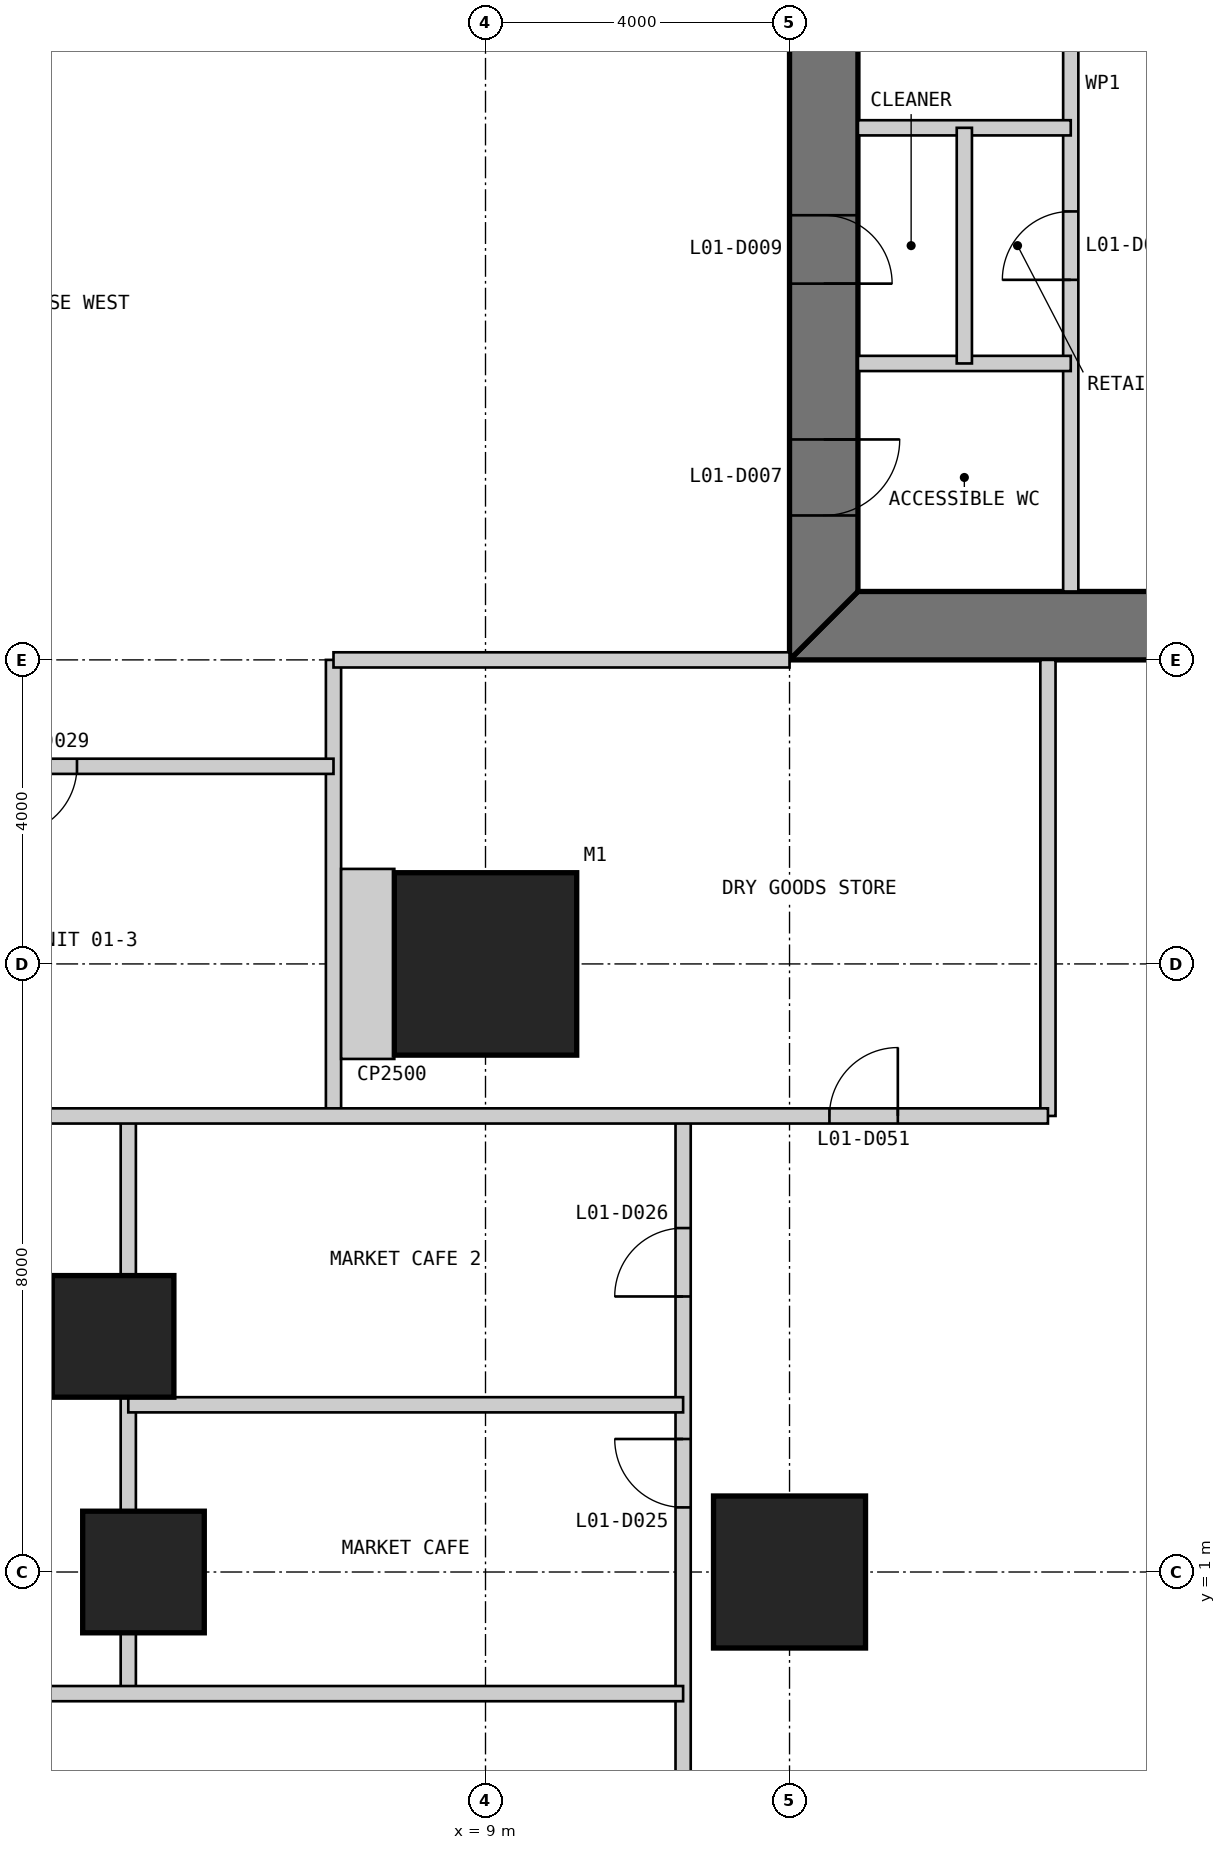
"""IFC4 building model, lengths in metres.
Left out: names, types, materials, properties, quantities, classifications, styles, units other than length and angle.
Written with IfcOpenShell. Run it as: python <this file> out.ifc"""

import sys

from ifc_helpers import new_model, si_unit, direction, frame, frame_2d, origin, origin_2d, place, context, subcontext, project, spatial, polyline, rectangle, outline, extrude, element, fill, save


model = new_model("IFC4")
c1 = context("Model", 3, precision=1e-05, world=origin(), true_north=direction((0.0, 1.0)))
c2 = subcontext(c1, "Body", "Model", "MODEL_VIEW")
j1 = project(units=[si_unit("LENGTHUNIT", "METRE"), si_unit("PLANEANGLEUNIT", "RADIAN")], contexts=[c1])
p1 = place(None, origin())
s1 = spatial("IfcSite", under=j1, at=p1, CompositionType="ELEMENT")
p2 = place(p1, origin())
s2 = spatial("IfcBuilding", under=s1, at=p2, CompositionType="ELEMENT")
p3 = place(p2, frame((0.0, 0.0, 7.0)))
s3 = spatial("IfcBuildingStorey", under=s2, at=p3, CompositionType="ELEMENT", Elevation=7.0)
p4 = place(p3, frame((9.0, 9.0, 0.0), z_axis=(0.0, 0.0, 1.0), x_axis=(1.0, 0.0, 0.0)))
e1 = element("IfcColumn", 1, at=p4, inside=s3, PredefinedType="COLUMN", context=c2, shape_type="SweptSolid", body=[
    extrude(rectangle(XDim=2.4, YDim=2.4, at=origin_2d()), origin(), (0.0, 0.0, 1.0), 4.8),
])
p5 = place(p3, frame((4.5, 1.0, 0.0), z_axis=(0.0, 0.0, 1.0), x_axis=(1.0, 0.0, 0.0)))
e2 = element("IfcColumn", 2, at=p5, inside=s3, PredefinedType="COLUMN", context=c2, shape_type="SweptSolid", body=[
    extrude(rectangle(XDim=1.6, YDim=1.6, at=origin_2d()), origin(), (0.0, 0.0, 1.0), 4.8),
])
p6 = place(p3, frame((13.0, 1.0, 0.0), z_axis=(0.0, 0.0, 1.0), x_axis=(1.0, 0.0, 0.0)))
e3 = element("IfcColumn", 3, at=p6, inside=s3, PredefinedType="COLUMN", context=c2, shape_type="SweptSolid", body=[
    extrude(rectangle(XDim=2.0, YDim=2.0, at=origin_2d()), origin(), (0.0, 0.0, 1.0), 4.8),
])
p7 = place(p3, frame((4.1, 4.1, 0.0), z_axis=(0.0, 0.0, 1.0), x_axis=(1.0, 0.0, 0.0)))
e4 = element("IfcColumn", 4, at=p7, inside=s3, PredefinedType="COLUMN", context=c2, shape_type="SweptSolid", body=[
    extrude(rectangle(XDim=1.6, YDim=1.6, at=origin_2d()), origin(), (0.0, 0.0, 1.0), 4.8),
])
p8 = place(p3, frame((13.0, 13.45, 0.0), z_axis=(0.0, 0.0, 1.0), x_axis=(1.0, 0.0, 0.0)))
e5 = element("IfcWall", 5, at=p8, inside=s3, PredefinedType="SHEAR", context=c2, shape_type="SweptSolid", body=[
    extrude(outline(polyline([(0.0, -0.45), (24.0, -0.45), (23.1, 0.45), (0.9, 0.45), (0.0, -0.45)])), origin(), (0.0, 0.0, 1.0), 4.8),
])
p9 = place(p8, frame((4.9, 0.0, 0.0)))
e6 = element("IfcOpeningElement", 6, at=p9, cuts=e5, PredefinedType="OPENING", context=c2, shape_type="SweptSolid", body=[
    extrude(rectangle(XDim=1.0, YDim=2.2, at=frame_2d((0.5, 1.1))), frame((0.0, 0.46, 0.0), z_axis=(0.0, -1.0, 0.0), x_axis=(1.0, 0.0, 0.0)), (0.0, 0.0, 1.0), 0.92),
])
p10 = place(p8, frame((8.9, 0.0, 0.0)))
e7 = element("IfcOpeningElement", 7, at=p10, cuts=e5, PredefinedType="OPENING", context=c2, shape_type="SweptSolid", body=[
    extrude(rectangle(XDim=1.1, YDim=2.2, at=frame_2d((0.55, 1.1))), frame((0.0, 0.46, 0.0), z_axis=(0.0, -1.0, 0.0), x_axis=(1.0, 0.0, 0.0)), (0.0, 0.0, 1.0), 0.92),
])
p11 = place(p8, frame((15.05, 0.0, 0.0)))
e8 = element("IfcOpeningElement", 8, at=p11, cuts=e5, PredefinedType="OPENING", context=c2, shape_type="SweptSolid", body=[
    extrude(rectangle(XDim=0.9, YDim=2.2, at=frame_2d((0.45, 1.1))), frame((0.0, 0.46, 0.0), z_axis=(0.0, -1.0, 0.0), x_axis=(1.0, 0.0, 0.0)), (0.0, 0.0, 1.0), 0.92),
])
p12 = place(p8, frame((17.9, 0.0, 0.0)))
e9 = element("IfcOpeningElement", 9, at=p12, cuts=e5, PredefinedType="OPENING", context=c2, shape_type="SweptSolid", body=[
    extrude(rectangle(XDim=1.0, YDim=2.2, at=frame_2d((0.5, 1.1))), frame((0.0, 0.46, 0.0), z_axis=(0.0, -1.0, 0.0), x_axis=(1.0, 0.0, 0.0)), (0.0, 0.0, 1.0), 0.92),
])
p13 = place(p8, frame((21.4, 0.0, 0.0)))
e10 = element("IfcOpeningElement", 10, at=p13, cuts=e5, PredefinedType="OPENING", context=c2, shape_type="SweptSolid", body=[
    extrude(rectangle(XDim=1.0, YDim=2.2, at=frame_2d((0.5, 1.1))), frame((0.0, 0.46, 0.0), z_axis=(0.0, -1.0, 0.0), x_axis=(1.0, 0.0, 0.0)), (0.0, 0.0, 1.0), 0.92),
])
p14 = place(p3, frame((13.45, 36.1, 0.0), z_axis=(0.0, 0.0, 1.0), x_axis=(0.0, -1.0, 0.0)))
e11 = element("IfcWall", 11, at=p14, inside=s3, PredefinedType="SHEAR", context=c2, shape_type="SweptSolid", body=[
    extrude(outline(polyline([(-0.9, -0.45), (23.1, -0.45), (22.2, 0.45), (0.0, 0.45), (-0.9, -0.45)])), origin(), (0.0, 0.0, 1.0), 4.8),
])
p15 = place(p14, frame((20.2, 0.0, 0.0)))
e12 = element("IfcOpeningElement", 12, at=p15, cuts=e11, PredefinedType="OPENING", context=c2, shape_type="SweptSolid", body=[
    extrude(rectangle(XDim=1.0, YDim=2.2, at=frame_2d((0.5, 1.1))), frame((0.0, 0.46, 0.0), z_axis=(0.0, -1.0, 0.0), x_axis=(1.0, 0.0, 0.0)), (0.0, 0.0, 1.0), 0.92),
])
p16 = place(p14, frame((17.25, 0.0, 0.0)))
e13 = element("IfcOpeningElement", 13, at=p16, cuts=e11, PredefinedType="OPENING", context=c2, shape_type="SweptSolid", body=[
    extrude(rectangle(XDim=0.9, YDim=2.2, at=frame_2d((0.45, 1.1))), frame((0.0, 0.46, 0.0), z_axis=(0.0, -1.0, 0.0), x_axis=(1.0, 0.0, 0.0)), (0.0, 0.0, 1.0), 0.92),
])
p17 = place(p3, frame((16.7, 13.9, 0.0), z_axis=(0.0, 0.0, 1.0), x_axis=(0.0, 1.0, 0.0)))
e14 = element("IfcWall", 14, at=p17, inside=s3, PredefinedType="PARTITIONING", context=c2, shape_type="SweptSolid", body=[
    extrude(rectangle(XDim=16.1, YDim=0.2, at=frame_2d((8.05, 0.0))), origin(), (0.0, 0.0, 1.0), 4.6),
])
p18 = place(p17, frame((4.1, 0.0, 0.0)))
e15 = element("IfcOpeningElement", 15, at=p18, cuts=e14, PredefinedType="OPENING", context=c2, shape_type="SweptSolid", body=[
    extrude(rectangle(XDim=0.9, YDim=2.2, at=frame_2d((0.45, 1.1))), frame((0.0, 0.11, 0.0), z_axis=(0.0, -1.0, 0.0), x_axis=(1.0, 0.0, 0.0)), (0.0, 0.0, 1.0), 0.22),
])
for number, where, z_axis, x_axis in (
    (16, (13.9, 20.0, 0.0), (0.0, 0.0, 1.0), (1.0, 0.0, 0.0)),
    (17, (13.9, 16.9, 0.0), (0.0, 0.0, 1.0), (1.0, 0.0, 0.0)),
):
    element("IfcWall", number, at=place(p3, frame(where, z_axis=z_axis, x_axis=x_axis)), inside=s3, PredefinedType="PARTITIONING", context=c2, shape_type="SweptSolid", body=[
        extrude(rectangle(XDim=2.8, YDim=0.2, at=frame_2d((1.4, 0.0))), origin(), (0.0, 0.0, 1.0), 4.6),
    ])
p19 = place(p3, frame((15.3, 16.9, 0.0), z_axis=(0.0, 0.0, 1.0), x_axis=(0.0, 1.0, 0.0)))
e18 = element("IfcWall", 18, at=p19, inside=s3, PredefinedType="PARTITIONING", context=c2, shape_type="SweptSolid", body=[
    extrude(rectangle(XDim=3.1, YDim=0.2, at=frame_2d((1.55, 0.0))), origin(), (0.0, 0.0, 1.0), 4.6),
])
p20 = place(p3, frame((4.3, -0.6, 0.0), z_axis=(0.0, 0.0, 1.0), x_axis=(0.0, 1.0, 0.0)))
e19 = element("IfcWall", 19, at=p20, inside=s3, PredefinedType="PARTITIONING", context=c2, shape_type="SweptSolid", body=[
    extrude(rectangle(XDim=0.8, YDim=0.2, at=frame_2d((0.4, 0.0))), origin(), (0.0, 0.0, 1.0), 4.5),
])
p21 = place(p3, frame((4.3, 1.8, 0.0), z_axis=(0.0, 0.0, 1.0), x_axis=(0.0, 1.0, 0.0)))
e20 = element("IfcWall", 20, at=p21, inside=s3, PredefinedType="PARTITIONING", context=c2, shape_type="SweptSolid", body=[
    extrude(rectangle(XDim=1.5, YDim=0.2, at=frame_2d((0.75, 0.0))), origin(), (0.0, 0.0, 1.0), 3.65),
])
p22 = place(p3, frame((4.3, 4.9, 0.0), z_axis=(0.0, 0.0, 1.0), x_axis=(0.0, 1.0, 0.0)))
e21 = element("IfcWall", 21, at=p22, inside=s3, PredefinedType="PARTITIONING", context=c2, shape_type="SweptSolid", body=[
    extrude(rectangle(XDim=2.1, YDim=0.2, at=frame_2d((1.05, 0.0))), origin(), (0.0, 0.0, 1.0), 4.5),
])
p23 = place(p3, frame((7.0, 7.0, 0.0), z_axis=(0.0, 0.0, 1.0), x_axis=(0.0, 1.0, 0.0)))
e22 = element("IfcWall", 22, at=p23, inside=s3, PredefinedType="PARTITIONING", context=c2, shape_type="SweptSolid", body=[
    extrude(rectangle(XDim=6.0, YDim=0.2, at=frame_2d((3.0, 0.0))), origin(), (0.0, 0.0, 1.0), 4.5),
])
p24 = place(p3, frame((11.6, -8.6, 0.0), z_axis=(0.0, 0.0, 1.0), x_axis=(0.0, 1.0, 0.0)))
e23 = element("IfcWall", 23, at=p24, inside=s3, PredefinedType="PARTITIONING", context=c2, shape_type="SweptSolid", body=[
    extrude(rectangle(XDim=15.6, YDim=0.2, at=frame_2d((7.8, 0.0))), origin(), (0.0, 0.0, 1.0), 4.5),
])
p25 = place(p24, frame((3.125, 0.0, 0.0)))
e24 = element("IfcOpeningElement", 24, at=p25, cuts=e23, PredefinedType="OPENING", context=c2, shape_type="SweptSolid", body=[
    extrude(rectangle(XDim=1.8, YDim=2.4, at=frame_2d((0.9, 1.2))), frame((0.0, 0.11, 0.0), z_axis=(0.0, -1.0, 0.0), x_axis=(1.0, 0.0, 0.0)), (0.0, 0.0, 1.0), 0.22),
])
p26 = place(p24, frame((10.45, 0.0, 0.0)))
e25 = element("IfcOpeningElement", 25, at=p26, cuts=e23, PredefinedType="OPENING", context=c2, shape_type="SweptSolid", body=[
    extrude(rectangle(XDim=0.9, YDim=2.2, at=frame_2d((0.45, 1.1))), frame((0.0, 0.11, 0.0), z_axis=(0.0, -1.0, 0.0), x_axis=(1.0, 0.0, 0.0)), (0.0, 0.0, 1.0), 0.22),
])
p27 = place(p24, frame((13.225, 0.0, 0.0)))
e26 = element("IfcOpeningElement", 26, at=p27, cuts=e23, PredefinedType="OPENING", context=c2, shape_type="SweptSolid", body=[
    extrude(rectangle(XDim=0.9, YDim=2.2, at=frame_2d((0.45, 1.1))), frame((0.0, 0.11, 0.0), z_axis=(0.0, -1.0, 0.0), x_axis=(1.0, 0.0, 0.0)), (0.0, 0.0, 1.0), 0.22),
])
p28 = place(p3, frame((16.4, 7.0, 0.0), z_axis=(0.0, 0.0, 1.0), x_axis=(0.0, 1.0, 0.0)))
e27 = element("IfcWall", 27, at=p28, inside=s3, PredefinedType="PARTITIONING", context=c2, shape_type="SweptSolid", body=[
    extrude(rectangle(XDim=6.0, YDim=0.2, at=frame_2d((3.0, 0.0))), origin(), (0.0, 0.0, 1.0), 4.5),
])
p29 = place(p3, frame((-0.6, -0.6, 0.0), z_axis=(0.0, 0.0, 1.0), x_axis=(1.0, 0.0, 0.0)))
e28 = element("IfcWall", 28, at=p29, inside=s3, PredefinedType="PARTITIONING", context=c2, shape_type="SweptSolid", body=[
    extrude(rectangle(XDim=12.2, YDim=0.2, at=frame_2d((6.1, 0.0))), origin(), (0.0, 0.0, 1.0), 4.5),
])
p30 = place(p3, frame((4.3, 3.2, 0.0), z_axis=(0.0, 0.0, 1.0), x_axis=(1.0, 0.0, 0.0)))
e29 = element("IfcWall", 29, at=p30, inside=s3, PredefinedType="PARTITIONING", context=c2, shape_type="SweptSolid", body=[
    extrude(rectangle(XDim=7.3, YDim=0.2, at=frame_2d((3.65, 0.0))), origin(), (0.0, 0.0, 1.0), 4.5),
])
p31 = place(p3, frame((-0.6, 7.0, 0.0), z_axis=(0.0, 0.0, 1.0), x_axis=(1.0, 0.0, 0.0)))
e30 = element("IfcWall", 30, at=p31, inside=s3, PredefinedType="PARTITIONING", context=c2, shape_type="SweptSolid", body=[
    extrude(rectangle(XDim=17.0, YDim=0.2, at=frame_2d((8.5, 0.0))), origin(), (0.0, 0.0, 1.0), 4.5),
])
p32 = place(p31, frame((14.125, 0.0, 0.0)))
e31 = element("IfcOpeningElement", 31, at=p32, cuts=e30, PredefinedType="OPENING", context=c2, shape_type="SweptSolid", body=[
    extrude(rectangle(XDim=0.9, YDim=2.2, at=frame_2d((0.45, 1.1))), frame((0.0, 0.11, 0.0), z_axis=(0.0, -1.0, 0.0), x_axis=(1.0, 0.0, 0.0)), (0.0, 0.0, 1.0), 0.22),
])
p33 = place(p3, frame((-15.25, 11.6, 0.0), z_axis=(0.0, 0.0, 1.0), x_axis=(1.0, 0.0, 0.0)))
e32 = element("IfcWall", 32, at=p33, inside=s3, PredefinedType="PARTITIONING", context=c2, shape_type="SweptSolid", body=[
    extrude(rectangle(XDim=22.25, YDim=0.2, at=frame_2d((11.125, 0.0))), origin(), (0.0, 0.0, 1.0), 4.5),
])
p34 = place(p33, frame((10.325, 0.0, 0.0)))
e33 = element("IfcOpeningElement", 33, at=p34, cuts=e32, PredefinedType="OPENING", context=c2, shape_type="SweptSolid", body=[
    extrude(rectangle(XDim=1.8, YDim=2.4, at=frame_2d((0.9, 1.2))), frame((0.0, 0.11, 0.0), z_axis=(0.0, -1.0, 0.0), x_axis=(1.0, 0.0, 0.0)), (0.0, 0.0, 1.0), 0.22),
])
p35 = place(p33, frame((3.025, 0.0, 0.0)))
e34 = element("IfcOpeningElement", 34, at=p35, cuts=e32, PredefinedType="OPENING", context=c2, shape_type="SweptSolid", body=[
    extrude(rectangle(XDim=1.8, YDim=2.4, at=frame_2d((0.9, 1.2))), frame((0.0, 0.11, 0.0), z_axis=(0.0, -1.0, 0.0), x_axis=(1.0, 0.0, 0.0)), (0.0, 0.0, 1.0), 0.22),
])
p36 = place(p33, frame((17.975, 0.0, 0.0)))
e35 = element("IfcOpeningElement", 35, at=p36, cuts=e32, PredefinedType="OPENING", context=c2, shape_type="SweptSolid", body=[
    extrude(rectangle(XDim=0.9, YDim=2.2, at=frame_2d((0.45, 1.1))), frame((0.0, 0.11, 0.0), z_axis=(0.0, -1.0, 0.0), x_axis=(1.0, 0.0, 0.0)), (0.0, 0.0, 1.0), 0.22),
])
p37 = place(p3, frame((7.0, 13.0, 0.0), z_axis=(0.0, 0.0, 1.0), x_axis=(1.0, 0.0, 0.0)))
e36 = element("IfcWall", 36, at=p37, inside=s3, PredefinedType="PARTITIONING", context=c2, shape_type="SweptSolid", body=[
    extrude(rectangle(XDim=6.0, YDim=0.2, at=frame_2d((3.0, 0.0))), origin(), (0.0, 0.0, 1.0), 3.653),
])
p38 = place(p3, frame((7.1, 9.0, 0.0), z_axis=(0.0, 0.0, 1.0), x_axis=(1.0, 0.0, 0.0)))
e37 = element("IfcWall", 37, at=p38, inside=s3, PredefinedType="PARTITIONING", context=c2, shape_type="SweptSolid", body=[
    extrude(rectangle(XDim=0.7, YDim=2.5, at=frame_2d((0.35, 0.0))), origin(), (0.0, 0.0, 1.0), 4.5),
])
p39 = place(p15, origin())
e38 = element("IfcDoor", 38, at=p39, inside=s3, OperationType="SINGLE_SWING_LEFT", PredefinedType="DOOR", context=c2, shape_type="SweptSolid", body=[
    extrude(rectangle(XDim=1.0, YDim=2.2, at=frame_2d((0.5, 1.1))), frame((0.0, 0.025, 0.0), z_axis=(0.0, -1.0, 0.0), x_axis=(1.0, 0.0, 0.0)), (0.0, 0.0, 1.0), 0.05),
    extrude(outline(polyline([(0.0, 0.0), (0.04, 0.0), (0.04, 2.16), (0.96, 2.16), (0.96, 0.0), (1.0, 0.0), (1.0, 2.2), (0.0, 2.2), (0.0, 0.0)])), frame((0.0, 0.3, 0.0), z_axis=(0.0, -1.0, 0.0), x_axis=(1.0, 0.0, 0.0)), (0.0, 0.0, 1.0), 0.6),
])
fill(e12, e38)
p40 = place(p18, origin())
e39 = element("IfcDoor", 39, at=p40, inside=s3, OperationType="SINGLE_SWING_LEFT", PredefinedType="DOOR", context=c2, shape_type="SweptSolid", body=[
    extrude(rectangle(XDim=0.9, YDim=2.2, at=frame_2d((0.45, 1.1))), frame((0.0, 0.025, 0.0), z_axis=(0.0, -1.0, 0.0), x_axis=(1.0, 0.0, 0.0)), (0.0, 0.0, 1.0), 0.05),
])
fill(e15, e39)
p41 = place(p16, origin())
e40 = element("IfcDoor", 40, at=p41, inside=s3, OperationType="SINGLE_SWING_RIGHT", PredefinedType="DOOR", context=c2, shape_type="SweptSolid", body=[
    extrude(rectangle(XDim=0.9, YDim=2.2, at=frame_2d((0.45, 1.1))), frame((0.0, 0.025, 0.0), z_axis=(0.0, -1.0, 0.0), x_axis=(1.0, 0.0, 0.0)), (0.0, 0.0, 1.0), 0.05),
    extrude(outline(polyline([(0.0, 0.0), (0.04, 0.0), (0.04, 2.16), (0.86, 2.16), (0.86, 0.0), (0.9, 0.0), (0.9, 2.2), (0.0, 2.2), (0.0, 0.0)])), frame((0.0, 0.3, 0.0), z_axis=(0.0, -1.0, 0.0), x_axis=(1.0, 0.0, 0.0)), (0.0, 0.0, 1.0), 0.6),
])
fill(e13, e40)
p42 = place(p26, origin())
e41 = element("IfcDoor", 41, at=p42, inside=s3, OperationType="SINGLE_SWING_RIGHT", PredefinedType="DOOR", context=c2, shape_type="SweptSolid", body=[
    extrude(rectangle(XDim=0.9, YDim=2.2, at=frame_2d((0.45, 1.1))), frame((0.0, 0.025, 0.0), z_axis=(0.0, -1.0, 0.0), x_axis=(1.0, 0.0, 0.0)), (0.0, 0.0, 1.0), 0.05),
])
fill(e25, e41)
p43 = place(p27, origin())
e42 = element("IfcDoor", 42, at=p43, inside=s3, OperationType="SINGLE_SWING_LEFT", PredefinedType="DOOR", context=c2, shape_type="SweptSolid", body=[
    extrude(rectangle(XDim=0.9, YDim=2.2, at=frame_2d((0.45, 1.1))), frame((0.0, 0.025, 0.0), z_axis=(0.0, -1.0, 0.0), x_axis=(1.0, 0.0, 0.0)), (0.0, 0.0, 1.0), 0.05),
])
fill(e26, e42)
p44 = place(p36, frame((0.9, 0.0, 0.0), z_axis=(0.0, 0.0, 1.0), x_axis=(-1.0, 0.0, 0.0)))
e43 = element("IfcDoor", 43, at=p44, inside=s3, OperationType="SINGLE_SWING_RIGHT", PredefinedType="DOOR", context=c2, shape_type="SweptSolid", body=[
    extrude(rectangle(XDim=0.9, YDim=2.2, at=frame_2d((0.45, 1.1))), frame((0.0, 0.025, 0.0), z_axis=(0.0, -1.0, 0.0), x_axis=(1.0, 0.0, 0.0)), (0.0, 0.0, 1.0), 0.05),
])
fill(e35, e43)
p45 = place(p32, origin())
e44 = element("IfcDoor", 44, at=p45, inside=s3, OperationType="SINGLE_SWING_RIGHT", PredefinedType="DOOR", context=c2, shape_type="SweptSolid", body=[
    extrude(rectangle(XDim=0.9, YDim=2.2, at=frame_2d((0.45, 1.1))), frame((0.0, 0.025, 0.0), z_axis=(0.0, -1.0, 0.0), x_axis=(1.0, 0.0, 0.0)), (0.0, 0.0, 1.0), 0.05),
])
fill(e31, e44)
save(model, sys.argv[1])
